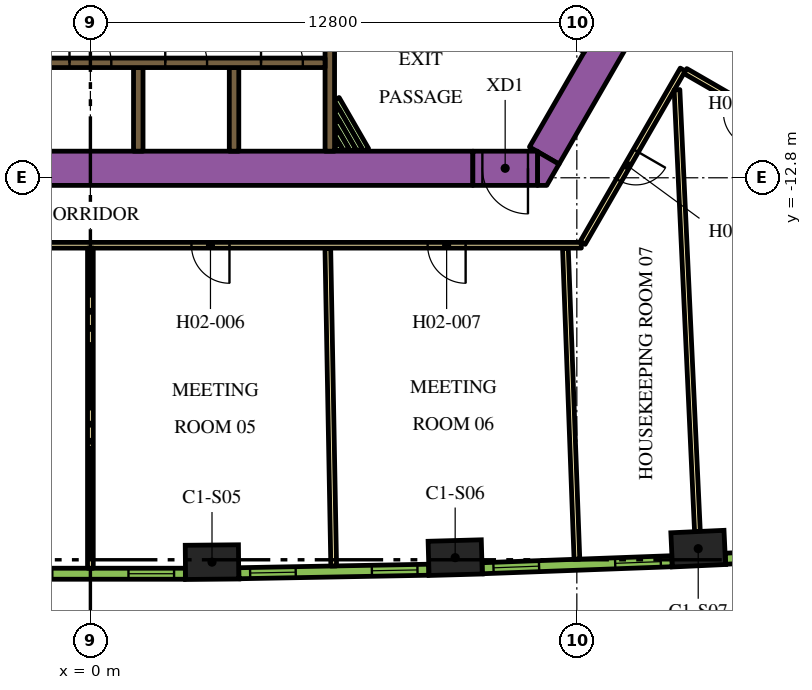
"""IFC4 building model, lengths in metres.
Left out: names, types, materials, properties, quantities, classifications, styles, units other than length and angle.
Written with IfcOpenShell. Run it as: python <this file> out.ifc"""

import sys

from ifc_helpers import new_model, si_unit, direction, frame, frame_2d, origin, origin_2d, place, context, subcontext, project, spatial, polyline, rectangle, outline, extrude, element, fill, save


model = new_model("IFC4")
c1 = context("Model", 3, precision=1e-05, world=origin(), true_north=direction((0.0, 1.0)))
c2 = subcontext(c1, "Body", "Model", "MODEL_VIEW")
j1 = project(units=[si_unit("LENGTHUNIT", "METRE"), si_unit("PLANEANGLEUNIT", "RADIAN")], contexts=[c1])
p1 = place(None, origin())
s1 = spatial("IfcSite", under=j1, at=p1, CompositionType="ELEMENT")
p2 = place(p1, origin())
s2 = spatial("IfcBuilding", under=s1, at=p2, CompositionType="ELEMENT")
p3 = place(p2, frame((0.0, 0.0, 47.1)))
s3 = spatial("IfcBuildingStorey", under=s2, at=p3, CompositionType="ELEMENT", Elevation=47.1)
for number, where, z_axis, x_axis in (
    (1, (3.2, -22.913, 0.0), (0.0, 0.0, 1.0), (1.0, 0.009, 0.0)),
    (2, (9.599, -22.795, 0.0), (0.0, 0.0, 1.0), (1.0, 0.028, 0.0)),
    (3, (15.994, -22.558, 0.0), (0.0, 0.0, 1.0), (0.999, 0.046, 0.0)),
):
    element("IfcColumn", number, at=place(p3, frame(where, z_axis=z_axis, x_axis=x_axis)), inside=s3, PredefinedType="COLUMN", context=c2, shape_type="SweptSolid", body=[
        extrude(rectangle(XDim=1.4, YDim=0.9, at=origin_2d()), origin(), (0.0, 0.0, 1.0), 3.9),
    ])
p4 = place(p3, frame((11.943, -12.214, 0.0), z_axis=(0.0, 0.0, 1.0), x_axis=(0.49998092645, 0.866036415623, 0.0)))
e4 = element("IfcWall", 4, at=p4, inside=s3, PredefinedType="SOLIDWALL", context=c2, shape_type="SweptSolid", body=[
    extrude(rectangle(XDim=8.83, YDim=0.9, at=frame_2d((4.415, 0.0))), origin(), (0.0, 0.0, 1.0), 3.9),
])
p5 = place(p3, origin())
e5 = element("IfcWall", 5, at=p5, inside=s3, PredefinedType="SOLIDWALL", context=c2, shape_type="SweptSolid", body=[
    extrude(outline(polyline([(12.009, -13.0), (11.764, -13.0), (11.764, -12.113), (12.332, -12.441), (12.009, -13.0)])), origin(), (0.0, 0.0, 1.0), 3.9),
])
p6 = place(p3, frame((-12.019, -12.55, 0.0), z_axis=(0.0, 0.0, 1.0), x_axis=(1.0, 0.0, 0.0)))
e6 = element("IfcWall", 6, at=p6, inside=s3, PredefinedType="SOLIDWALL", context=c2, shape_type="SweptSolid", body=[
    extrude(rectangle(XDim=22.083, YDim=0.9, at=frame_2d((11.042, 0.0))), origin(), (0.0, 0.0, 1.0), 3.9),
])
p7 = place(p3, frame((6.3, -12.1, 0.0), z_axis=(0.0, 0.0, 1.0), x_axis=(0.0, 1.0, 0.0)))
e7 = element("IfcWall", 7, at=p7, inside=s3, PredefinedType="SOLIDWALL", context=c2, shape_type="SweptSolid", body=[
    extrude(rectangle(XDim=3.428, YDim=0.25, at=frame_2d((1.714, 0.0))), origin(), (0.0, 0.0, 1.0), 3.9),
])
for number, where, z_axis, x_axis in (
    (8, (3.78, -12.1, 0.0), (0.0, 0.0, 1.0), (0.0, 1.0, 0.0)),
    (9, (1.26, -12.1, 0.0), (0.0, 0.0, 1.0), (0.0, 1.0, 0.0)),
):
    element("IfcWall", number, at=place(p3, frame(where, z_axis=z_axis, x_axis=x_axis)), inside=s3, PredefinedType="SOLIDWALL", context=c2, shape_type="SweptSolid", body=[
        extrude(rectangle(XDim=2.2, YDim=0.25, at=frame_2d((1.1, 0.0))), origin(), (0.0, 0.0, 1.0), 3.9),
    ])
p8 = place(p3, frame((6.48, -10.726, 0.0), z_axis=(0.0, 0.0, 1.0), x_axis=(0.500017819788, -0.86601511528, 0.0)))
e10 = element("IfcWall", 10, at=p8, inside=s3, PredefinedType="PARTITIONING", context=c2, shape_type="SweptSolid", body=[
    extrude(rectangle(XDim=1.55, YDim=0.15, at=frame_2d((0.775, 0.0))), origin(), (0.0, 0.0, 1.0), 2.75),
])
p9 = place(p3, frame((6.48, -11.026, 0.0), z_axis=(0.0, 0.0, 1.0), x_axis=(0.49995654735, -0.86605048973, 0.0)))
e11 = element("IfcWall", 11, at=p9, inside=s3, PredefinedType="PARTITIONING", context=c2, shape_type="SweptSolid", body=[
    extrude(rectangle(XDim=1.204, YDim=0.15, at=frame_2d((0.602, 0.0))), origin(), (0.0, 0.0, 1.0), 2.75),
])
p10 = place(p3, frame((6.48, -11.326, 0.0), z_axis=(0.0, 0.0, 1.0), x_axis=(0.500059337743, -0.865991142412, 0.0)))
e12 = element("IfcWall", 12, at=p10, inside=s3, PredefinedType="PARTITIONING", context=c2, shape_type="SweptSolid", body=[
    extrude(rectangle(XDim=0.857, YDim=0.15, at=frame_2d((0.429, 0.0))), origin(), (0.0, 0.0, 1.0), 2.75),
])
p11 = place(p3, frame((6.48, -11.626, 0.0), z_axis=(0.0, 0.0, 1.0), x_axis=(0.500301480982, -0.865851273677, 0.0)))
e13 = element("IfcWall", 13, at=p11, inside=s3, PredefinedType="PARTITIONING", context=c2, shape_type="SweptSolid", body=[
    extrude(rectangle(XDim=0.511, YDim=0.15, at=frame_2d((0.255, 0.0))), origin(), (0.0, 0.0, 1.0), 2.75),
])
p12 = place(p3, frame((6.48, -11.926, 0.0), z_axis=(0.0, 0.0, 1.0), x_axis=(0.500450775723, -0.86576499183, 0.0)))
e14 = element("IfcWall", 14, at=p12, inside=s3, PredefinedType="PARTITIONING", context=c2, shape_type="SweptSolid", body=[
    extrude(rectangle(XDim=0.164, YDim=0.15, at=frame_2d((0.082, 0.0))), origin(), (0.0, 0.0, 1.0), 2.75),
])
p13 = place(p3, frame((-6.175, -9.775, 0.0), z_axis=(0.0, 0.0, 1.0), x_axis=(1.0, 0.0, 0.0)))
e15 = element("IfcWall", 15, at=p13, inside=s3, PredefinedType="SOLIDWALL", context=c2, shape_type="SweptSolid", body=[
    extrude(rectangle(XDim=12.35, YDim=0.25, at=frame_2d((6.175, 0.0))), origin(), (0.0, 0.0, 1.0), 3.9),
])
p14 = place(p13, frame((0.585, 0.0, 0.0)))
e16 = element("IfcOpeningElement", 16, at=p14, cuts=e15, PredefinedType="OPENING", context=c2, shape_type="SweptSolid", body=[
    extrude(rectangle(XDim=1.1, YDim=2.1, at=frame_2d((0.55, 1.05))), frame((0.0, 0.135, 0.0), z_axis=(0.0, -1.0, 0.0), x_axis=(1.0, 0.0, 0.0)), (0.0, 0.0, 1.0), 0.27),
])
p15 = place(p13, frame((3.105, 0.0, 0.0)))
e17 = element("IfcOpeningElement", 17, at=p15, cuts=e15, PredefinedType="OPENING", context=c2, shape_type="SweptSolid", body=[
    extrude(rectangle(XDim=1.1, YDim=2.1, at=frame_2d((0.55, 1.05))), frame((0.0, 0.135, 0.0), z_axis=(0.0, -1.0, 0.0), x_axis=(1.0, 0.0, 0.0)), (0.0, 0.0, 1.0), 0.27),
])
p16 = place(p13, frame((5.625, 0.0, 0.0)))
e18 = element("IfcOpeningElement", 18, at=p16, cuts=e15, PredefinedType="OPENING", context=c2, shape_type="SweptSolid", body=[
    extrude(rectangle(XDim=1.1, YDim=2.1, at=frame_2d((0.55, 1.05))), frame((0.0, 0.135, 0.0), z_axis=(0.0, -1.0, 0.0), x_axis=(1.0, 0.0, 0.0)), (0.0, 0.0, 1.0), 0.27),
])
p17 = place(p13, frame((8.145, 0.0, 0.0)))
e19 = element("IfcOpeningElement", 19, at=p17, cuts=e15, PredefinedType="OPENING", context=c2, shape_type="SweptSolid", body=[
    extrude(rectangle(XDim=1.1, YDim=2.1, at=frame_2d((0.55, 1.05))), frame((0.0, 0.135, 0.0), z_axis=(0.0, -1.0, 0.0), x_axis=(1.0, 0.0, 0.0)), (0.0, 0.0, 1.0), 0.27),
])
p18 = place(p13, frame((10.665, 0.0, 0.0)))
e20 = element("IfcOpeningElement", 20, at=p18, cuts=e15, PredefinedType="OPENING", context=c2, shape_type="SweptSolid", body=[
    extrude(rectangle(XDim=1.1, YDim=2.1, at=frame_2d((0.55, 1.05))), frame((0.0, 0.135, 0.0), z_axis=(0.0, -1.0, 0.0), x_axis=(1.0, 0.0, 0.0)), (0.0, 0.0, 1.0), 0.27),
])
p19 = place(p3, frame((11.764, -12.55, 0.0), z_axis=(0.0, 0.0, 1.0), x_axis=(-1.0, 0.0, 0.0)))
e21 = element("IfcWall", 21, at=p19, inside=s3, PredefinedType="SOLIDWALL", context=c2, shape_type="SweptSolid", body=[
    extrude(rectangle(XDim=1.7, YDim=0.9, at=frame_2d((0.85, 0.0))), origin(), (0.0, 0.0, 1.0), 3.9),
])
p20 = place(p19, frame((0.25, 0.0, 0.0)))
e22 = element("IfcOpeningElement", 22, at=p20, cuts=e21, PredefinedType="OPENING", context=c2, shape_type="SweptSolid", body=[
    extrude(rectangle(XDim=1.2, YDim=2.1, at=frame_2d((0.6, 1.05))), frame((0.0, 0.46, 0.0), z_axis=(0.0, -1.0, 0.0), x_axis=(1.0, 0.0, 0.0)), (0.0, 0.0, 1.0), 0.92),
])
p21 = place(p3, frame((16.412, -8.523, 0.0), z_axis=(0.0, 0.0, 1.0), x_axis=(0.866022197818, -0.500005552856, 0.0)))
e23 = element("IfcWall", 23, at=p21, inside=s3, PredefinedType="PARTITIONING", context=c2, shape_type="SweptSolid", body=[
    extrude(rectangle(XDim=16.224, YDim=0.15, at=frame_2d((8.112, 0.0))), origin(), (0.0, 0.0, 1.0), 2.75),
])
p22 = place(p21, frame((7.949, 0.0, 0.0)))
e24 = element("IfcOpeningElement", 24, at=p22, cuts=e23, PredefinedType="OPENING", context=c2, shape_type="SweptSolid", body=[
    extrude(rectangle(XDim=1.0, YDim=2.1, at=frame_2d((0.5, 1.05))), frame((0.0, 0.085, 0.0), z_axis=(0.0, -1.0, 0.0), x_axis=(1.0, 0.0, 0.0)), (0.0, 0.0, 1.0), 0.17),
])
p23 = place(p21, frame((0.526, 0.0, 0.0)))
e25 = element("IfcOpeningElement", 25, at=p23, cuts=e23, PredefinedType="OPENING", context=c2, shape_type="SweptSolid", body=[
    extrude(rectangle(XDim=1.0, YDim=2.1, at=frame_2d((0.5, 1.05))), frame((0.0, 0.085, 0.0), z_axis=(0.0, -1.0, 0.0), x_axis=(1.0, 0.0, 0.0)), (0.0, 0.0, 1.0), 0.17),
])
p24 = place(p3, frame((12.918, -14.575, 0.0), z_axis=(0.0, 0.0, 1.0), x_axis=(-1.0, 0.0, 0.0)))
e26 = element("IfcWall", 26, at=p24, inside=s3, PredefinedType="PARTITIONING", context=c2, shape_type="SweptSolid", body=[
    extrude(rectangle(XDim=25.766, YDim=0.15, at=frame_2d((12.883, 0.0))), origin(), (0.0, 0.0, 1.0), 2.75),
])
p25 = place(p24, frame((17.141, 0.0, 0.0)))
e27 = element("IfcOpeningElement", 27, at=p25, cuts=e26, PredefinedType="OPENING", context=c2, shape_type="SweptSolid", body=[
    extrude(rectangle(XDim=1.0, YDim=2.1, at=frame_2d((0.5, 1.05))), frame((0.0, 0.085, 0.0), z_axis=(0.0, -1.0, 0.0), x_axis=(1.0, 0.0, 0.0)), (0.0, 0.0, 1.0), 0.17),
])
p26 = place(p24, frame((9.259, 0.0, 0.0)))
e28 = element("IfcOpeningElement", 28, at=p26, cuts=e26, PredefinedType="OPENING", context=c2, shape_type="SweptSolid", body=[
    extrude(rectangle(XDim=1.0, YDim=2.1, at=frame_2d((0.5, 1.05))), frame((0.0, 0.085, 0.0), z_axis=(0.0, -1.0, 0.0), x_axis=(1.0, 0.0, 0.0)), (0.0, 0.0, 1.0), 0.17),
])
p27 = place(p24, frame((3.044, 0.0, 0.0)))
e29 = element("IfcOpeningElement", 29, at=p27, cuts=e26, PredefinedType="OPENING", context=c2, shape_type="SweptSolid", body=[
    extrude(rectangle(XDim=1.0, YDim=2.1, at=frame_2d((0.5, 1.05))), frame((0.0, 0.085, 0.0), z_axis=(0.0, -1.0, 0.0), x_axis=(1.0, 0.0, 0.0)), (0.0, 0.0, 1.0), 0.17),
])
p28 = place(p3, frame((15.587, -9.952, 0.0), z_axis=(0.0, 0.0, 1.0), x_axis=(-0.500016618951, -0.866015808616, 0.0)))
e30 = element("IfcWall", 30, at=p28, inside=s3, PredefinedType="PARTITIONING", context=c2, shape_type="SweptSolid", body=[
    extrude(rectangle(XDim=5.268, YDim=0.15, at=frame_2d((2.634, 0.0))), origin(), (0.0, 0.0, 1.0), 2.75),
])
p29 = place(p28, frame((2.465, 0.0, 0.0)))
e31 = element("IfcOpeningElement", 31, at=p29, cuts=e30, PredefinedType="OPENING", context=c2, shape_type="SweptSolid", body=[
    extrude(rectangle(XDim=0.9, YDim=2.1, at=frame_2d((0.45, 1.05))), frame((0.0, 0.085, 0.0), z_axis=(0.0, -1.0, 0.0), x_axis=(1.0, 0.0, 0.0)), (0.0, 0.0, 1.0), 0.17),
])
p30 = place(p3, frame((29.638, -18.064, 0.0), z_axis=(0.0, 0.0, 1.0), x_axis=(-0.866026175601, 0.499998663172, 0.0)))
e32 = element("IfcWall", 32, at=p30, inside=s3, PredefinedType="PARTITIONING", context=c2, shape_type="SweptSolid", body=[
    extrude(rectangle(XDim=16.144, YDim=0.15, at=frame_2d((8.072, 0.0))), origin(), (0.0, 0.0, 1.0), 2.75),
])
p31 = place(p30, frame((13.948, 0.0, 0.0)))
e33 = element("IfcOpeningElement", 33, at=p31, cuts=e32, PredefinedType="OPENING", context=c2, shape_type="SweptSolid", body=[
    extrude(rectangle(XDim=0.9, YDim=2.1, at=frame_2d((0.45, 1.05))), frame((0.0, 0.085, 0.0), z_axis=(0.0, -1.0, 0.0), x_axis=(1.0, 0.0, 0.0)), (0.0, 0.0, 1.0), 0.17),
])
p32 = place(p30, frame((11.004, 0.0, 0.0)))
e34 = element("IfcOpeningElement", 34, at=p32, cuts=e32, PredefinedType="OPENING", context=c2, shape_type="SweptSolid", body=[
    extrude(rectangle(XDim=1.0, YDim=2.1, at=frame_2d((0.5, 1.05))), frame((0.0, 0.085, 0.0), z_axis=(0.0, -1.0, 0.0), x_axis=(1.0, 0.0, 0.0)), (0.0, 0.0, 1.0), 0.17),
])
p33 = place(p3, frame((0.0, -23.073, 0.0), z_axis=(0.0, 0.0, 1.0), x_axis=(0.0, 1.0, 0.0)))
e35 = element("IfcWall", 35, at=p33, inside=s3, PredefinedType="PARTITIONING", context=c2, shape_type="SweptSolid", body=[
    extrude(rectangle(XDim=8.423, YDim=0.15, at=frame_2d((4.212, 0.0))), origin(), (0.0, 0.0, 1.0), 2.75),
])
p34 = place(p3, frame((6.402, -23.014, 0.0), z_axis=(0.0, 0.0, 1.0), x_axis=(-0.01849587109, 0.999828936745, 0.0)))
e36 = element("IfcWall", 36, at=p34, inside=s3, PredefinedType="PARTITIONING", context=c2, shape_type="SweptSolid", body=[
    extrude(rectangle(XDim=8.355, YDim=0.15, at=frame_2d((4.178, 0.0))), origin(), (0.0, 0.0, 1.0), 2.75),
])
p35 = place(p3, frame((12.802, -22.836, 0.0), z_axis=(0.0, 0.0, 1.0), x_axis=(-0.036969723281, 0.999316386116, 0.0)))
e37 = element("IfcWall", 37, at=p35, inside=s3, PredefinedType="PARTITIONING", context=c2, shape_type="SweptSolid", body=[
    extrude(rectangle(XDim=8.182, YDim=0.15, at=frame_2d((4.091, 0.0))), origin(), (0.0, 0.0, 1.0), 2.75),
])
p36 = place(p3, frame((15.973, -22.109, 0.0), z_axis=(0.0, 0.0, 1.0), x_axis=(-0.046191717129, 0.998932592955, 0.0)))
e38 = element("IfcWall", 38, at=p36, inside=s3, PredefinedType="PARTITIONING", context=c2, shape_type="SweptSolid", body=[
    extrude(rectangle(XDim=11.638, YDim=0.15, at=frame_2d((5.819, 0.0))), origin(), (0.0, 0.0, 1.0), 2.75),
])
p37 = place(p3, frame((-2.499, -23.218, 0.0), z_axis=(0.0, 0.0, 1.0), x_axis=(1.0, 0.0, 0.0)))
e39 = element("IfcWall", 39, at=p37, inside=s3, PredefinedType="SOLIDWALL", context=c2, shape_type="SweptSolid", body=[
    extrude(rectangle(XDim=4.998, YDim=0.29, at=frame_2d((2.499, 0.0))), origin(), (0.0, 0.0, 1.0), 3.65),
])
p38 = place(p37, frame((0.297, 0.0, 0.9)))
e40 = element("IfcOpeningElement", 40, at=p38, cuts=e39, PredefinedType="OPENING", context=c2, shape_type="SweptSolid", body=[
    extrude(rectangle(XDim=1.2, YDim=2.15, at=frame_2d((0.6, 1.075))), frame((0.0, 0.155, 0.0), z_axis=(0.0, -1.0, 0.0), x_axis=(1.0, 0.0, 0.0)), (0.0, 0.0, 1.0), 0.31),
])
p39 = place(p37, frame((3.501, 0.0, 0.9)))
e41 = element("IfcOpeningElement", 41, at=p39, cuts=e39, PredefinedType="OPENING", context=c2, shape_type="SweptSolid", body=[
    extrude(rectangle(XDim=1.2, YDim=2.15, at=frame_2d((0.6, 1.075))), frame((0.0, 0.155, 0.0), z_axis=(0.0, -1.0, 0.0), x_axis=(1.0, 0.0, 0.0)), (0.0, 0.0, 1.0), 0.31),
])
p40 = place(p3, frame((3.906, -23.205, 0.0), z_axis=(0.0, 0.0, 1.0), x_axis=(0.999829529479, 0.018463801951, 0.0)))
e42 = element("IfcWall", 42, at=p40, inside=s3, PredefinedType="SOLIDWALL", context=c2, shape_type="SweptSolid", body=[
    extrude(rectangle(XDim=4.998, YDim=0.29, at=frame_2d((2.499, 0.0))), origin(), (0.0, 0.0, 1.0), 3.65),
])
p41 = place(p40, frame((0.297, 0.0, 0.9)))
e43 = element("IfcOpeningElement", 43, at=p41, cuts=e42, PredefinedType="OPENING", context=c2, shape_type="SweptSolid", body=[
    extrude(rectangle(XDim=1.2, YDim=2.15, at=frame_2d((0.6, 1.075))), frame((0.0, 0.155, 0.0), z_axis=(0.0, -1.0, 0.0), x_axis=(1.0, 0.0, 0.0)), (0.0, 0.0, 1.0), 0.31),
])
p42 = place(p40, frame((3.501, 0.0, 0.9)))
e44 = element("IfcOpeningElement", 44, at=p42, cuts=e42, PredefinedType="OPENING", context=c2, shape_type="SweptSolid", body=[
    extrude(rectangle(XDim=1.2, YDim=2.15, at=frame_2d((0.6, 1.075))), frame((0.0, 0.155, 0.0), z_axis=(0.0, -1.0, 0.0), x_axis=(1.0, 0.0, 0.0)), (0.0, 0.0, 1.0), 0.31),
])
p43 = place(p3, frame((10.31, -23.074, 0.0), z_axis=(0.0, 0.0, 1.0), x_axis=(0.999317974969, 0.036926750529, 0.0)))
e45 = element("IfcWall", 45, at=p43, inside=s3, PredefinedType="SOLIDWALL", context=c2, shape_type="SweptSolid", body=[
    extrude(rectangle(XDim=4.998, YDim=0.29, at=frame_2d((2.499, 0.0))), origin(), (0.0, 0.0, 1.0), 3.65),
])
p44 = place(p43, frame((0.297, 0.0, 0.9)))
e46 = element("IfcOpeningElement", 46, at=p44, cuts=e45, PredefinedType="OPENING", context=c2, shape_type="SweptSolid", body=[
    extrude(rectangle(XDim=1.2, YDim=2.15, at=frame_2d((0.6, 1.075))), frame((0.0, 0.155, 0.0), z_axis=(0.0, -1.0, 0.0), x_axis=(1.0, 0.0, 0.0)), (0.0, 0.0, 1.0), 0.31),
])
p45 = place(p43, frame((3.501, 0.0, 0.9)))
e47 = element("IfcOpeningElement", 47, at=p45, cuts=e45, PredefinedType="OPENING", context=c2, shape_type="SweptSolid", body=[
    extrude(rectangle(XDim=1.2, YDim=2.15, at=frame_2d((0.6, 1.075))), frame((0.0, 0.155, 0.0), z_axis=(0.0, -1.0, 0.0), x_axis=(1.0, 0.0, 0.0)), (0.0, 0.0, 1.0), 0.31),
])
p46 = place(p3, frame((16.711, -22.824, 0.0), z_axis=(0.0, 0.0, 1.0), x_axis=(0.998464708705, 0.055391564976, 0.0)))
e48 = element("IfcWall", 48, at=p46, inside=s3, PredefinedType="SOLIDWALL", context=c2, shape_type="SweptSolid", body=[
    extrude(rectangle(XDim=4.998, YDim=0.29, at=frame_2d((2.499, 0.0))), origin(), (0.0, 0.0, 1.0), 3.65),
])
p47 = place(p46, frame((0.297, 0.0, 0.9)))
e49 = element("IfcOpeningElement", 49, at=p47, cuts=e48, PredefinedType="OPENING", context=c2, shape_type="SweptSolid", body=[
    extrude(rectangle(XDim=1.2, YDim=2.15, at=frame_2d((0.6, 1.075))), frame((0.0, 0.155, 0.0), z_axis=(0.0, -1.0, 0.0), x_axis=(1.0, 0.0, 0.0)), (0.0, 0.0, 1.0), 0.31),
])
p48 = place(p46, frame((3.501, 0.0, 0.9)))
e50 = element("IfcOpeningElement", 50, at=p48, cuts=e48, PredefinedType="OPENING", context=c2, shape_type="SweptSolid", body=[
    extrude(rectangle(XDim=1.2, YDim=2.15, at=frame_2d((0.6, 1.075))), frame((0.0, 0.155, 0.0), z_axis=(0.0, -1.0, 0.0), x_axis=(1.0, 0.0, 0.0)), (0.0, 0.0, 1.0), 0.31),
])
p49 = place(p16, origin())
e51 = element("IfcDoor", 51, at=p49, inside=s3, OperationType="DOUBLE_DOOR_SLIDING", PredefinedType="DOOR", context=c2, shape_type="SweptSolid", body=[
    extrude(rectangle(XDim=1.1, YDim=2.1, at=frame_2d((0.55, 1.05))), frame((0.0, 0.025, 0.0), z_axis=(0.0, -1.0, 0.0), x_axis=(1.0, 0.0, 0.0)), (0.0, 0.0, 1.0), 0.05),
])
fill(e18, e51)
p50 = place(p17, origin())
e52 = element("IfcDoor", 52, at=p50, inside=s3, OperationType="DOUBLE_DOOR_SLIDING", PredefinedType="DOOR", context=c2, shape_type="SweptSolid", body=[
    extrude(rectangle(XDim=1.1, YDim=2.1, at=frame_2d((0.55, 1.05))), frame((0.0, 0.025, 0.0), z_axis=(0.0, -1.0, 0.0), x_axis=(1.0, 0.0, 0.0)), (0.0, 0.0, 1.0), 0.05),
])
fill(e19, e52)
p51 = place(p18, origin())
e53 = element("IfcDoor", 53, at=p51, inside=s3, OperationType="DOUBLE_DOOR_SLIDING", PredefinedType="DOOR", context=c2, shape_type="SweptSolid", body=[
    extrude(rectangle(XDim=1.1, YDim=2.1, at=frame_2d((0.55, 1.05))), frame((0.0, 0.025, 0.0), z_axis=(0.0, -1.0, 0.0), x_axis=(1.0, 0.0, 0.0)), (0.0, 0.0, 1.0), 0.05),
])
fill(e20, e53)
p52 = place(p20, origin())
e54 = element("IfcDoor", 54, at=p52, inside=s3, OperationType="SINGLE_SWING_LEFT", PredefinedType="DOOR", context=c2, shape_type="SweptSolid", body=[
    extrude(rectangle(XDim=1.2, YDim=2.1, at=frame_2d((0.6, 1.05))), frame((0.0, 0.025, 0.0), z_axis=(0.0, -1.0, 0.0), x_axis=(1.0, 0.0, 0.0)), (0.0, 0.0, 1.0), 0.05),
])
fill(e22, e54)
p53 = place(p26, origin())
e55 = element("IfcDoor", 55, at=p53, inside=s3, OperationType="SINGLE_SWING_LEFT", PredefinedType="DOOR", context=c2, shape_type="SweptSolid", body=[
    extrude(rectangle(XDim=1.0, YDim=2.1, at=frame_2d((0.5, 1.05))), frame((0.0, 0.025, 0.0), z_axis=(0.0, -1.0, 0.0), x_axis=(1.0, 0.0, 0.0)), (0.0, 0.0, 1.0), 0.05),
])
fill(e28, e55)
p54 = place(p27, origin())
e56 = element("IfcDoor", 56, at=p54, inside=s3, OperationType="SINGLE_SWING_RIGHT", PredefinedType="DOOR", context=c2, shape_type="SweptSolid", body=[
    extrude(rectangle(XDim=1.0, YDim=2.1, at=frame_2d((0.5, 1.05))), frame((0.0, 0.025, 0.0), z_axis=(0.0, -1.0, 0.0), x_axis=(1.0, 0.0, 0.0)), (0.0, 0.0, 1.0), 0.05),
])
fill(e29, e56)
p55 = place(p29, origin())
e57 = element("IfcDoor", 57, at=p55, inside=s3, OperationType="SINGLE_SWING_LEFT", PredefinedType="DOOR", context=c2, shape_type="SweptSolid", body=[
    extrude(rectangle(XDim=0.9, YDim=2.1, at=frame_2d((0.45, 1.05))), frame((0.0, 0.025, 0.0), z_axis=(0.0, -1.0, 0.0), x_axis=(1.0, 0.0, 0.0)), (0.0, 0.0, 1.0), 0.05),
])
fill(e31, e57)
p56 = place(p31, origin())
e58 = element("IfcDoor", 58, at=p56, inside=s3, OperationType="SINGLE_SWING_RIGHT", PredefinedType="DOOR", context=c2, shape_type="SweptSolid", body=[
    extrude(rectangle(XDim=0.9, YDim=2.1, at=frame_2d((0.45, 1.05))), frame((0.0, 0.025, 0.0), z_axis=(0.0, -1.0, 0.0), x_axis=(1.0, 0.0, 0.0)), (0.0, 0.0, 1.0), 0.05),
])
fill(e33, e58)
p57 = place(p39, origin())
e59 = element("IfcWindow", 59, at=p57, inside=s3, PartitioningType="DOUBLE_PANEL_VERTICAL", PredefinedType="WINDOW", context=c2, shape_type="SweptSolid", body=[
    extrude(rectangle(XDim=1.2, YDim=2.15, at=frame_2d((0.6, 1.075))), frame((0.0, 0.015, 0.0), z_axis=(0.0, -1.0, 0.0), x_axis=(1.0, 0.0, 0.0)), (0.0, 0.0, 1.0), 0.06),
])
fill(e41, e59)
p58 = place(p41, origin())
e60 = element("IfcWindow", 60, at=p58, inside=s3, PartitioningType="DOUBLE_PANEL_VERTICAL", PredefinedType="WINDOW", context=c2, shape_type="SweptSolid", body=[
    extrude(rectangle(XDim=1.2, YDim=2.15, at=frame_2d((0.6, 1.075))), frame((0.0, 0.015, 0.0), z_axis=(0.0, -1.0, 0.0), x_axis=(1.0, 0.0, 0.0)), (0.0, 0.0, 1.0), 0.06),
])
fill(e43, e60)
p59 = place(p42, origin())
e61 = element("IfcWindow", 61, at=p59, inside=s3, PartitioningType="DOUBLE_PANEL_VERTICAL", PredefinedType="WINDOW", context=c2, shape_type="SweptSolid", body=[
    extrude(rectangle(XDim=1.2, YDim=2.15, at=frame_2d((0.6, 1.075))), frame((0.0, 0.015, 0.0), z_axis=(0.0, -1.0, 0.0), x_axis=(1.0, 0.0, 0.0)), (0.0, 0.0, 1.0), 0.06),
])
fill(e44, e61)
p60 = place(p44, origin())
e62 = element("IfcWindow", 62, at=p60, inside=s3, PartitioningType="DOUBLE_PANEL_VERTICAL", PredefinedType="WINDOW", context=c2, shape_type="SweptSolid", body=[
    extrude(rectangle(XDim=1.2, YDim=2.15, at=frame_2d((0.6, 1.075))), frame((0.0, 0.015, 0.0), z_axis=(0.0, -1.0, 0.0), x_axis=(1.0, 0.0, 0.0)), (0.0, 0.0, 1.0), 0.06),
])
fill(e46, e62)
p61 = place(p45, origin())
e63 = element("IfcWindow", 63, at=p61, inside=s3, PartitioningType="DOUBLE_PANEL_VERTICAL", PredefinedType="WINDOW", context=c2, shape_type="SweptSolid", body=[
    extrude(rectangle(XDim=1.2, YDim=2.15, at=frame_2d((0.6, 1.075))), frame((0.0, 0.015, 0.0), z_axis=(0.0, -1.0, 0.0), x_axis=(1.0, 0.0, 0.0)), (0.0, 0.0, 1.0), 0.06),
])
fill(e47, e63)
save(model, sys.argv[1])
